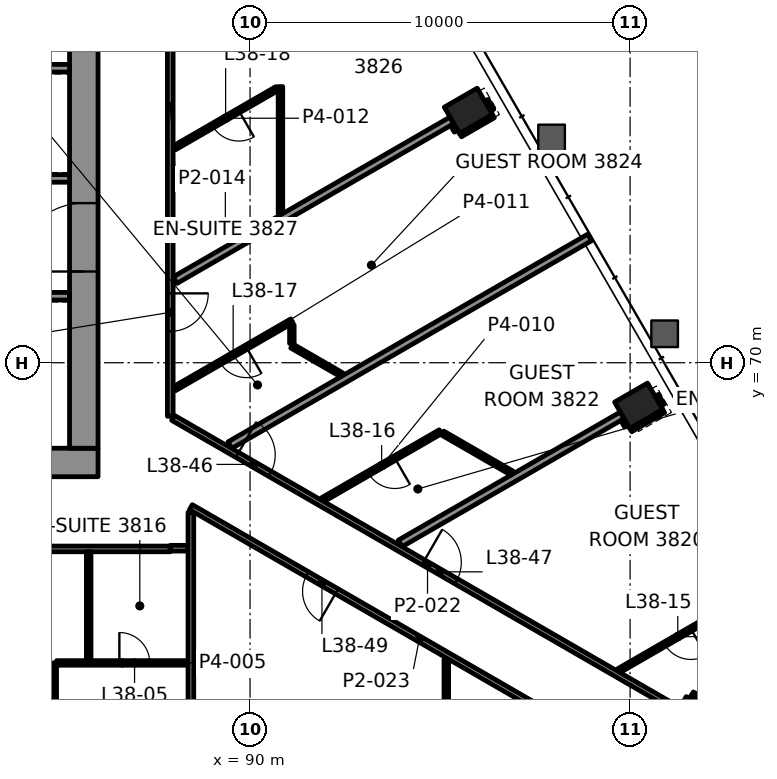
"""IFC4 building model, lengths in metres.
Left out: names, types, materials, properties, quantities, classifications, styles, units other than length and angle.
Written with IfcOpenShell. Run it as: python <this file> out.ifc"""

import sys

from ifc_helpers import new_model, si_unit, direction, frame, frame_2d, origin, origin_2d, place, context, subcontext, project, spatial, rectangle, hollow_rectangle, extrude, element, fill, save


model = new_model("IFC4")
c1 = context("Model", 3, precision=1e-05, world=origin(), true_north=direction((0.0, 1.0)))
c2 = subcontext(c1, "Body", "Model", "MODEL_VIEW")
j1 = project(units=[si_unit("LENGTHUNIT", "METRE"), si_unit("PLANEANGLEUNIT", "RADIAN")], contexts=[c1])
p1 = place(None, origin())
s1 = spatial("IfcSite", under=j1, at=p1, CompositionType="ELEMENT")
p2 = place(p1, origin())
s2 = spatial("IfcBuilding", under=s1, at=p2, CompositionType="ELEMENT")
p3 = place(p2, frame((0.0, 0.0, 167.5)))
s3 = spatial("IfcBuildingStorey", under=s2, at=p3, CompositionType="ELEMENT", Elevation=167.5)
p4 = place(p3, frame((102.127, 59.338, 0.0), z_axis=(0.0, 0.0, 1.0), x_axis=(0.5, 0.866025403784, 0.0)))
e1 = element("IfcColumn", 1, at=p4, inside=s3, PredefinedType="COLUMN", context=c2, shape_type="SweptSolid", body=[
    extrude(rectangle(XDim=2.8, YDim=2.8, at=origin_2d()), origin(), (0.0, 0.0, 1.0), 3.9),
])
for number, where, z_axis, x_axis in (
    (2, (100.225, 68.867, -0.0), (0.0, 0.0, 1.0), (-0.5, 0.866, 0.0)),
    (3, (95.744, 76.628, -0.0), (0.0, 0.0, 1.0), (-0.5, 0.866, 0.0)),
):
    element("IfcColumn", number, at=place(p3, frame(where, z_axis=z_axis, x_axis=x_axis)), inside=s3, PredefinedType="COLUMN", context=c2, shape_type="SweptSolid", body=[
        extrude(hollow_rectangle(XDim=0.8, YDim=1.0, WallThickness=0.05, at=origin_2d()), origin(), (0.0, 0.0, 1.0), 3.9),
    ])
p5 = place(p3, frame((64.0, 67.375, 0.0), z_axis=(0.0, 0.0, 1.0), x_axis=(1.0, 0.0, 0.0)))
e4 = element("IfcWall", 4, at=p5, inside=s3, PredefinedType="SHEAR", context=c2, shape_type="SweptSolid", body=[
    extrude(rectangle(XDim=22.0, YDim=0.75, at=frame_2d((11.0, 0.0))), origin(), (0.0, 0.0, 1.0), 3.7),
])
p6 = place(p5, frame((1.575, 0.0, 0.0)))
e5 = element("IfcOpeningElement", 5, at=p6, cuts=e4, PredefinedType="OPENING", context=c2, shape_type="SweptSolid", body=[
    extrude(rectangle(XDim=0.9, YDim=2.1, at=frame_2d((0.45, 1.05))), frame((0.0, 0.385, 0.0), z_axis=(0.0, -1.0, 0.0), x_axis=(1.0, 0.0, 0.0)), (0.0, 0.0, 1.0), 0.77),
])
p7 = place(p5, frame((4.425, 0.0, 0.0)))
e6 = element("IfcOpeningElement", 6, at=p7, cuts=e4, PredefinedType="OPENING", context=c2, shape_type="SweptSolid", body=[
    extrude(rectangle(XDim=0.9, YDim=2.1, at=frame_2d((0.45, 1.05))), frame((0.0, 0.385, 0.0), z_axis=(0.0, -1.0, 0.0), x_axis=(1.0, 0.0, 0.0)), (0.0, 0.0, 1.0), 0.77),
])
p8 = place(p3, frame((85.625, 67.75, 0.0), z_axis=(0.0, 0.0, 1.0), x_axis=(0.0, 1.0, 0.0)))
e7 = element("IfcWall", 7, at=p8, inside=s3, PredefinedType="SHEAR", context=c2, shape_type="SweptSolid", body=[
    extrude(rectangle(XDim=14.5, YDim=0.75, at=frame_2d((7.25, 0.0))), origin(), (0.0, 0.0, 1.0), 3.7),
])
p9 = place(p8, frame((4.65, 0.0, 0.0)))
e8 = element("IfcOpeningElement", 8, at=p9, cuts=e7, PredefinedType="OPENING", context=c2, shape_type="SweptSolid", body=[
    extrude(rectangle(XDim=1.8, YDim=2.1, at=frame_2d((0.9, 1.05))), frame((0.0, 0.385, 0.0), z_axis=(0.0, -1.0, 0.0), x_axis=(1.0, 0.0, 0.0)), (0.0, 0.0, 1.0), 0.77),
])
p10 = place(p8, frame((11.8, 0.0, 0.0)))
e9 = element("IfcOpeningElement", 9, at=p10, cuts=e7, PredefinedType="OPENING", context=c2, shape_type="SweptSolid", body=[
    extrude(rectangle(XDim=0.9, YDim=2.1, at=frame_2d((0.45, 1.05))), frame((0.0, 0.385, 0.0), z_axis=(0.0, -1.0, 0.0), x_axis=(1.0, 0.0, 0.0)), (0.0, 0.0, 1.0), 0.77),
])
p11 = place(p3, frame((84.908, 62.1, 0.0), z_axis=(0.0, 0.0, 1.0), x_axis=(1.0, 0.0, 0.0)))
e10 = element("IfcWall", 10, at=p11, inside=s3, PredefinedType="PARTITIONING", context=c2, shape_type="SweptSolid", body=[
    extrude(rectangle(XDim=3.46, YDim=0.12, at=frame_2d((1.73, 0.0))), origin(), (0.0, 0.0, 1.0), 3.1),
])
p12 = place(p11, frame((1.653, 0.0, 0.0)))
e11 = element("IfcOpeningElement", 11, at=p12, cuts=e10, PredefinedType="OPENING", context=c2, shape_type="SweptSolid", body=[
    extrude(rectangle(XDim=0.8, YDim=2.1, at=frame_2d((0.4, 1.05))), frame((0.0, 0.07, 0.0), z_axis=(0.0, -1.0, 0.0), x_axis=(1.0, 0.0, 0.0)), (0.0, 0.0, 1.0), 0.14),
])
p13 = place(p3, frame((87.899, 65.1, 0.0), z_axis=(0.0, 0.0, 1.0), x_axis=(-1.0, 0.0, 0.0)))
e12 = element("IfcWall", 12, at=p13, inside=s3, PredefinedType="PARTITIONING", context=c2, shape_type="SweptSolid", body=[
    extrude(rectangle(XDim=25.799, YDim=0.15, at=frame_2d((12.899, 0.0))), origin(), (0.0, 0.0, 1.0), 3.1),
])
p14 = place(p13, frame((4.782, 0.0, 0.0)))
e13 = element("IfcOpeningElement", 13, at=p14, cuts=e12, PredefinedType="OPENING", context=c2, shape_type="SweptSolid", body=[
    extrude(rectangle(XDim=1.0, YDim=2.1, at=frame_2d((0.5, 1.05))), frame((0.0, 0.085, 0.0), z_axis=(0.0, -1.0, 0.0), x_axis=(1.0, 0.0, 0.0)), (0.0, 0.0, 1.0), 0.17),
])
p15 = place(p13, frame((8.636, 0.0, 0.0)))
e14 = element("IfcOpeningElement", 14, at=p15, cuts=e12, PredefinedType="OPENING", context=c2, shape_type="SweptSolid", body=[
    extrude(rectangle(XDim=1.0, YDim=2.1, at=frame_2d((0.5, 1.05))), frame((0.0, 0.085, 0.0), z_axis=(0.0, -1.0, 0.0), x_axis=(1.0, 0.0, 0.0)), (0.0, 0.0, 1.0), 0.17),
])
p16 = place(p13, frame((13.117, 0.0, 0.0)))
e15 = element("IfcOpeningElement", 15, at=p16, cuts=e12, PredefinedType="OPENING", context=c2, shape_type="SweptSolid", body=[
    extrude(rectangle(XDim=1.0, YDim=2.1, at=frame_2d((0.5, 1.05))), frame((0.0, 0.085, 0.0), z_axis=(0.0, -1.0, 0.0), x_axis=(1.0, 0.0, 0.0)), (0.0, 0.0, 1.0), 0.17),
])
p17 = place(p13, frame((17.598, 0.0, 0.0)))
e16 = element("IfcOpeningElement", 16, at=p17, cuts=e12, PredefinedType="OPENING", context=c2, shape_type="SweptSolid", body=[
    extrude(rectangle(XDim=1.0, YDim=2.1, at=frame_2d((0.5, 1.05))), frame((0.0, 0.085, 0.0), z_axis=(0.0, -1.0, 0.0), x_axis=(1.0, 0.0, 0.0)), (0.0, 0.0, 1.0), 0.17),
])
p18 = place(p13, frame((22.079, 0.0, 0.0)))
e17 = element("IfcOpeningElement", 17, at=p18, cuts=e12, PredefinedType="OPENING", context=c2, shape_type="SweptSolid", body=[
    extrude(rectangle(XDim=1.0, YDim=2.1, at=frame_2d((0.5, 1.05))), frame((0.0, 0.085, 0.0), z_axis=(0.0, -1.0, 0.0), x_axis=(1.0, 0.0, 0.0)), (0.0, 0.0, 1.0), 0.17),
])
p19 = place(p3, frame((87.9, 65.119, 0.0), z_axis=(0.0, 0.0, 1.0), x_axis=(1.0, 0.0, 0.0)))
e18 = element("IfcWall", 18, at=p19, inside=s3, PredefinedType="PARTITIONING", context=c2, shape_type="SweptSolid", body=[
    extrude(rectangle(XDim=0.468, YDim=0.15, at=frame_2d((0.234, 0.0))), origin(), (0.0, 0.0, 1.0), 3.1),
])
p20 = place(p3, frame((102.8, 63.684, 0.0), z_axis=(0.0, 0.0, 1.0), x_axis=(-0.866028357664, -0.499994883695, 0.0)))
e19 = element("IfcWall", 19, at=p20, inside=s3, PredefinedType="PARTITIONING", context=c2, shape_type="SweptSolid", body=[
    extrude(rectangle(XDim=3.568, YDim=0.12, at=frame_2d((1.784, 0.0))), origin(), (0.0, 0.0, 1.0), 3.1),
])
p21 = place(p20, frame((1.384, 0.0, 0.0)))
e20 = element("IfcOpeningElement", 20, at=p21, cuts=e19, PredefinedType="OPENING", context=c2, shape_type="SweptSolid", body=[
    extrude(rectangle(XDim=0.8, YDim=2.1, at=frame_2d((0.4, 1.05))), frame((0.0, 0.07, 0.0), z_axis=(0.0, -1.0, 0.0), x_axis=(1.0, 0.0, 0.0)), (0.0, 0.0, 1.0), 0.14),
])
p22 = place(p3, frame((99.993, 68.271, 0.0), z_axis=(0.0, 0.0, 1.0), x_axis=(0.86597798544, 0.50008212199, 0.0)))
e21 = element("IfcWall", 21, at=p22, inside=s3, PredefinedType="PARTITIONING", context=c2, shape_type="SweptSolid", body=[
    extrude(rectangle(XDim=0.999, YDim=0.2, at=frame_2d((0.5, 0.0))), origin(), (0.0, 0.0, 1.0), 3.1),
])
p23 = place(p3, frame((93.951, 65.245, 0.0), z_axis=(0.0, 0.0, 1.0), x_axis=(0.866027052535, 0.49999714427, 0.0)))
e22 = element("IfcWall", 22, at=p23, inside=s3, PredefinedType="PARTITIONING", context=c2, shape_type="SweptSolid", body=[
    extrude(rectangle(XDim=6.745, YDim=0.2, at=frame_2d((3.372, 0.0))), origin(), (0.0, 0.0, 1.0), 3.1),
])
p24 = place(p3, frame((95.008, 68.183, 0.0), z_axis=(0.0, 0.0, 1.0), x_axis=(-0.866028357664, -0.499994883695, 0.0)))
e23 = element("IfcWall", 23, at=p24, inside=s3, PredefinedType="PARTITIONING", context=c2, shape_type="SweptSolid", body=[
    extrude(rectangle(XDim=3.568, YDim=0.12, at=frame_2d((1.784, 0.0))), origin(), (0.0, 0.0, 1.0), 3.1),
])
p25 = place(p24, frame((1.384, 0.0, 0.0)))
e24 = element("IfcOpeningElement", 24, at=p25, cuts=e23, PredefinedType="OPENING", context=c2, shape_type="SweptSolid", body=[
    extrude(rectangle(XDim=0.8, YDim=2.1, at=frame_2d((0.4, 1.05))), frame((0.0, 0.07, 0.0), z_axis=(0.0, -1.0, 0.0), x_axis=(1.0, 0.0, 0.0)), (0.0, 0.0, 1.0), 0.14),
])
p26 = place(p3, frame((89.47, 67.832, 0.0), z_axis=(0.0, 0.0, 1.0), x_axis=(0.866016372647, 0.500015642063, 0.0)))
e25 = element("IfcWall", 25, at=p26, inside=s3, PredefinedType="PARTITIONING", context=c2, shape_type="SweptSolid", body=[
    extrude(rectangle(XDim=10.932, YDim=0.2, at=frame_2d((5.466, 0.0))), origin(), (0.0, 0.0, 1.0), 3.022),
])
p27 = place(p3, frame((91.1, 71.101, 0.0), z_axis=(0.0, 0.0, 1.0), x_axis=(-0.866045460162, -0.499965259726, 0.0)))
e26 = element("IfcWall", 26, at=p27, inside=s3, PredefinedType="PARTITIONING", context=c2, shape_type="SweptSolid", body=[
    extrude(rectangle(XDim=3.569, YDim=0.12, at=frame_2d((1.784, 0.0))), origin(), (0.0, 0.0, 1.0), 3.1),
])
p28 = place(p27, frame((1.384, 0.0, 0.0)))
e27 = element("IfcOpeningElement", 27, at=p28, cuts=e26, PredefinedType="OPENING", context=c2, shape_type="SweptSolid", body=[
    extrude(rectangle(XDim=0.8, YDim=2.1, at=frame_2d((0.4, 1.05))), frame((0.0, 0.07, 0.0), z_axis=(0.0, -1.0, 0.0), x_axis=(1.0, 0.0, 0.0)), (0.0, 0.0, 1.0), 0.14),
])
p29 = place(p3, frame((95.512, 76.032, 0.0), z_axis=(0.0, 0.0, 1.0), x_axis=(0.86597798544, 0.50008212199, 0.0)))
e28 = element("IfcWall", 28, at=p29, inside=s3, PredefinedType="PARTITIONING", context=c2, shape_type="SweptSolid", body=[
    extrude(rectangle(XDim=0.999, YDim=0.2, at=frame_2d((0.5, 0.0))), origin(), (0.0, 0.0, 1.0), 3.022),
])
p30 = place(p3, frame((88.027, 72.173, 0.0), z_axis=(0.0, 0.0, 1.0), x_axis=(0.866035743139, 0.499982091285, 0.0)))
e29 = element("IfcWall", 29, at=p30, inside=s3, PredefinedType="PARTITIONING", context=c2, shape_type="SweptSolid", body=[
    extrude(rectangle(XDim=8.411, YDim=0.2, at=frame_2d((4.206, 0.0))), origin(), (0.0, 0.0, 1.0), 3.1),
])
p31 = place(p3, frame((90.705, 77.212, 0.0), z_axis=(0.0, 0.0, 1.0), x_axis=(-0.866009247561, -0.500027982357, 0.0)))
e30 = element("IfcWall", 30, at=p31, inside=s3, PredefinedType="PARTITIONING", context=c2, shape_type="SweptSolid", body=[
    extrude(rectangle(XDim=3.113, YDim=0.12, at=frame_2d((1.556, 0.0))), origin(), (0.0, 0.0, 1.0), 3.1),
])
p32 = place(p31, frame((1.156, 0.0, 0.0)))
e31 = element("IfcOpeningElement", 31, at=p32, cuts=e30, PredefinedType="OPENING", context=c2, shape_type="SweptSolid", body=[
    extrude(rectangle(XDim=0.8, YDim=2.1, at=frame_2d((0.4, 1.05))), frame((0.0, 0.07, 0.0), z_axis=(0.0, -1.0, 0.0), x_axis=(1.0, 0.0, 0.0)), (0.0, 0.0, 1.0), 0.14),
])
p33 = place(p3, frame((95.164, 55.121, 0.0), z_axis=(0.0, 0.0, 1.0), x_axis=(0.0, 1.0, 0.0)))
e32 = element("IfcWall", 32, at=p33, inside=s3, PredefinedType="PARTITIONING", context=c2, shape_type="SweptSolid", body=[
    extrude(rectangle(XDim=7.072, YDim=0.12, at=frame_2d((3.536, 0.0))), origin(), (0.0, 0.0, 1.0), 3.1),
])
p34 = place(p3, frame((91.1, 70.508, 0.0), z_axis=(0.0, 0.0, 1.0), x_axis=(0.0, 1.0, 0.0)))
e33 = element("IfcWall", 33, at=p34, inside=s3, PredefinedType="PARTITIONING", context=c2, shape_type="SweptSolid", body=[
    extrude(rectangle(XDim=0.484, YDim=0.12, at=frame_2d((0.242, 0.0))), origin(), (0.0, 0.0, 1.0), 3.1),
])
p35 = place(p3, frame((90.8, 73.929, 0.0), z_axis=(0.0, 0.0, 1.0), x_axis=(0.0, 1.0, 0.0)))
e34 = element("IfcWall", 34, at=p35, inside=s3, PredefinedType="PARTITIONING", context=c2, shape_type="SweptSolid", body=[
    extrude(rectangle(XDim=3.337, YDim=0.12, at=frame_2d((1.668, 0.0))), origin(), (0.0, 0.0, 1.0), 3.1),
])
p36 = place(p3, frame((88.443, 55.121, 0.0), z_axis=(0.0, 0.0, 1.0), x_axis=(0.0, 1.0, 0.0)))
e35 = element("IfcWall", 35, at=p36, inside=s3, PredefinedType="PARTITIONING", context=c2, shape_type="SweptSolid", body=[
    extrude(rectangle(XDim=10.942, YDim=0.15, at=frame_2d((5.471, 0.0))), origin(), (0.0, 0.0, 1.0), 2.947),
])
p37 = place(p3, frame((87.9, 84.899, 0.0), z_axis=(0.0, 0.0, 1.0), x_axis=(0.0, -1.0, 0.0)))
e36 = element("IfcWall", 36, at=p37, inside=s3, PredefinedType="PARTITIONING", context=c2, shape_type="SweptSolid", body=[
    extrude(rectangle(XDim=16.308, YDim=0.15, at=frame_2d((8.154, 0.0))), origin(), (0.0, 0.0, 1.0), 3.1),
])
p38 = place(p37, frame((5.527, 0.0, 0.0)))
e37 = element("IfcOpeningElement", 37, at=p38, cuts=e36, PredefinedType="OPENING", context=c2, shape_type="SweptSolid", body=[
    extrude(rectangle(XDim=1.0, YDim=2.1, at=frame_2d((0.5, 1.05))), frame((0.0, 0.085, 0.0), z_axis=(0.0, -1.0, 0.0), x_axis=(1.0, 0.0, 0.0)), (0.0, 0.0, 1.0), 0.17),
])
p39 = place(p37, frame((13.074, 0.0, 0.0)))
e38 = element("IfcOpeningElement", 38, at=p39, cuts=e36, PredefinedType="OPENING", context=c2, shape_type="SweptSolid", body=[
    extrude(rectangle(XDim=1.0, YDim=2.1, at=frame_2d((0.5, 1.05))), frame((0.0, 0.085, 0.0), z_axis=(0.0, -1.0, 0.0), x_axis=(1.0, 0.0, 0.0)), (0.0, 0.0, 1.0), 0.17),
])
p40 = place(p3, frame((85.754, 62.16, 0.0), z_axis=(0.0, 0.0, 1.0), x_axis=(0.0, 1.0, 0.0)))
e39 = element("IfcWall", 39, at=p40, inside=s3, PredefinedType="PARTITIONING", context=c2, shape_type="SweptSolid", body=[
    extrude(rectangle(XDim=2.865, YDim=0.12, at=frame_2d((1.433, 0.0))), origin(), (0.0, 0.0, 1.0), 3.1),
])
p41 = place(p3, frame((84.858, 62.1, 0.0), z_axis=(0.0, 0.0, 1.0), x_axis=(0.0, -1.0, 0.0)))
e40 = element("IfcWall", 40, at=p41, inside=s3, PredefinedType="PARTITIONING", context=c2, shape_type="SweptSolid", body=[
    extrude(rectangle(XDim=6.979, YDim=0.1, at=frame_2d((3.49, 0.0))), origin(), (0.0, 0.0, 1.0), 3.022),
])
p42 = place(p41, frame((2.79, 0.0, 0.0)))
e41 = element("IfcOpeningElement", 41, at=p42, cuts=e40, PredefinedType="OPENING", context=c2, shape_type="SweptSolid", body=[
    extrude(rectangle(XDim=0.9, YDim=2.1, at=frame_2d((0.45, 1.05))), frame((0.0, 0.06, 0.0), z_axis=(0.0, -1.0, 0.0), x_axis=(1.0, 0.0, 0.0)), (0.0, 0.0, 1.0), 0.12),
])
for number, where, z_axis, x_axis in (
    (42, (100.808, 68.858, 0.0), (0.0, 0.0, 1.0), (-0.5, 0.866, 0.0)),
    (43, (96.327, 76.619, 0.0), (0.0, 0.0, 1.0), (-0.5, 0.866, 0.0)),
):
    element("IfcWall", number, at=place(p3, frame(where, z_axis=z_axis, x_axis=x_axis)), inside=s3, PredefinedType="PARTITIONING", context=c2, shape_type="SweptSolid", body=[
        extrude(rectangle(XDim=0.299, YDim=0.2, at=frame_2d((0.149, 0.0))), origin(), (0.0, 0.0, 1.0), 3.1),
    ])
for number, where, z_axis, x_axis in (
    (44, (99.942, 68.358, 0.0), (0.0, 0.0, 1.0), (-0.5, 0.866, 0.0)),
    (45, (95.461, 76.119, 0.0), (0.0, 0.0, 1.0), (-0.5, 0.866, 0.0)),
):
    element("IfcWall", number, at=place(p3, frame(where, z_axis=z_axis, x_axis=x_axis)), inside=s3, PredefinedType="PARTITIONING", context=c2, shape_type="SweptSolid", body=[
        extrude(rectangle(XDim=0.199, YDim=0.2, at=frame_2d((0.1, 0.0))), origin(), (0.0, 0.0, 1.0), 3.1),
    ])
p43 = place(p3, frame((96.889, 67.097, 0.0), z_axis=(0.0, 0.0, 1.0), x_axis=(-0.866034836963, 0.4999836609, 0.0)))
e46 = element("IfcWall", 46, at=p43, inside=s3, PredefinedType="PARTITIONING", context=c2, shape_type="SweptSolid", body=[
    extrude(rectangle(XDim=2.104, YDim=0.12, at=frame_2d((1.052, 0.0))), origin(), (0.0, 0.0, 1.0), 3.1),
])
p44 = place(p3, frame((92.408, 69.684, 0.0), z_axis=(0.0, 0.0, 1.0), x_axis=(-0.865986401109, 0.500067548531, 0.0)))
e47 = element("IfcWall", 47, at=p44, inside=s3, PredefinedType="PARTITIONING", context=c2, shape_type="SweptSolid", body=[
    extrude(rectangle(XDim=1.51, YDim=0.12, at=frame_2d((0.755, 0.0))), origin(), (0.0, 0.0, 1.0), 3.1),
])
p45 = place(p3, frame((104.438, 59.621, 0.0), z_axis=(0.0, 0.0, 1.0), x_axis=(-0.866035906198, 0.499981808845, 0.0)))
e48 = element("IfcWall", 48, at=p45, inside=s3, PredefinedType="PARTITIONING", context=c2, shape_type="SweptSolid", body=[
    extrude(rectangle(XDim=3.259, YDim=0.2, at=frame_2d((1.63, 0.0))), origin(), (0.0, 0.0, 1.0), 3.1),
])
p46 = place(p3, frame((87.975, 68.548, 0.0), z_axis=(0.0, 0.0, 1.0), x_axis=(0.866029648708, -0.499992647504, 0.0)))
e49 = element("IfcWall", 49, at=p46, inside=s3, PredefinedType="PARTITIONING", context=c2, shape_type="SweptSolid", body=[
    extrude(rectangle(XDim=15.461, YDim=0.15, at=frame_2d((7.73, 0.0))), origin(), (0.0, 0.0, 1.0), 3.1),
])
p47 = place(p46, frame((1.948, 0.0, 0.0)))
e50 = element("IfcOpeningElement", 50, at=p47, cuts=e49, PredefinedType="OPENING", context=c2, shape_type="SweptSolid", body=[
    extrude(rectangle(XDim=1.0, YDim=2.1, at=frame_2d((0.5, 1.05))), frame((0.0, 0.085, 0.0), z_axis=(0.0, -1.0, 0.0), x_axis=(1.0, 0.0, 0.0)), (0.0, 0.0, 1.0), 0.17),
])
p48 = place(p46, frame((7.602, 0.0, 0.0)))
e51 = element("IfcOpeningElement", 51, at=p48, cuts=e49, PredefinedType="OPENING", context=c2, shape_type="SweptSolid", body=[
    extrude(rectangle(XDim=1.0, YDim=2.1, at=frame_2d((0.5, 1.05))), frame((0.0, 0.085, 0.0), z_axis=(0.0, -1.0, 0.0), x_axis=(1.0, 0.0, 0.0)), (0.0, 0.0, 1.0), 0.17),
])
p49 = place(p3, frame((100.464, 59.259, 0.0), z_axis=(0.0, 0.0, 1.0), x_axis=(-0.866026545444, 0.499998022582, 0.0)))
e52 = element("IfcWall", 52, at=p49, inside=s3, PredefinedType="PARTITIONING", context=c2, shape_type="SweptSolid", body=[
    extrude(rectangle(XDim=13.881, YDim=0.15, at=frame_2d((6.94, 0.0))), origin(), (0.0, 0.0, 1.0), 2.947),
])
p50 = place(p49, frame((0.566, 0.0, 0.0)))
e53 = element("IfcOpeningElement", 53, at=p50, cuts=e52, PredefinedType="OPENING", context=c2, shape_type="SweptSolid", body=[
    extrude(rectangle(XDim=1.0, YDim=2.1, at=frame_2d((0.5, 1.05))), frame((0.0, 0.085, 0.0), z_axis=(0.0, -1.0, 0.0), x_axis=(1.0, 0.0, 0.0)), (0.0, 0.0, 1.0), 0.17),
])
p51 = place(p49, frame((9.448, 0.0, 0.0)))
e54 = element("IfcOpeningElement", 54, at=p51, cuts=e52, PredefinedType="OPENING", context=c2, shape_type="SweptSolid", body=[
    extrude(rectangle(XDim=0.9, YDim=2.1, at=frame_2d((0.45, 1.05))), frame((0.0, 0.085, 0.0), z_axis=(0.0, -1.0, 0.0), x_axis=(1.0, 0.0, 0.0)), (0.0, 0.0, 1.0), 0.17),
])
p52 = place(p3, frame((101.402, 60.883, 0.0), z_axis=(0.0, 0.0, 1.0), x_axis=(0.500265064493, 0.865872314633, 0.0)))
e55 = element("IfcWall", 55, at=p52, inside=s3, PredefinedType="PARTITIONING", context=c2, shape_type="SweptSolid", body=[
    extrude(rectangle(XDim=0.324, YDim=0.2, at=frame_2d((0.162, 0.0))), origin(), (0.0, 0.0, 1.0), 3.1),
])
for number, where, z_axis, x_axis in (
    (56, (84.6, 71.75, 0.0), (0.0, 0.0, 1.0), (1.0, 0.0, 0.0)),
    (57, (84.6, 74.85, 0.0), (0.0, 0.0, 1.0), (1.0, 0.0, 0.0)),
    (58, (84.6, 77.75, 0.0), (0.0, 0.0, 1.0), (1.0, 0.0, 0.0)),
):
    element("IfcWall", number, at=place(p3, frame(where, z_axis=z_axis, x_axis=x_axis)), inside=s3, PredefinedType="PARTITIONING", context=c2, shape_type="SweptSolid", body=[
        extrude(rectangle(XDim=0.65, YDim=0.2, at=frame_2d((0.325, 0.0))), origin(), (0.0, 0.0, 1.0), 3.7),
    ])
p53 = place(p12, origin())
e59 = element("IfcDoor", 59, at=p53, inside=s3, OperationType="SINGLE_SWING_LEFT", PredefinedType="DOOR", context=c2, shape_type="SweptSolid", body=[
    extrude(rectangle(XDim=0.8, YDim=2.1, at=frame_2d((0.4, 1.05))), frame((0.0, 0.025, 0.0), z_axis=(0.0, -1.0, 0.0), x_axis=(1.0, 0.0, 0.0)), (0.0, 0.0, 1.0), 0.05),
])
fill(e11, e59)
p54 = place(p21, origin())
e60 = element("IfcDoor", 60, at=p54, inside=s3, OperationType="SINGLE_SWING_LEFT", PredefinedType="DOOR", context=c2, shape_type="SweptSolid", body=[
    extrude(rectangle(XDim=0.8, YDim=2.1, at=frame_2d((0.4, 1.05))), frame((0.0, 0.025, 0.0), z_axis=(0.0, -1.0, 0.0), x_axis=(1.0, 0.0, 0.0)), (0.0, 0.0, 1.0), 0.05),
])
fill(e20, e60)
p55 = place(p25, origin())
e61 = element("IfcDoor", 61, at=p55, inside=s3, OperationType="SINGLE_SWING_LEFT", PredefinedType="DOOR", context=c2, shape_type="SweptSolid", body=[
    extrude(rectangle(XDim=0.8, YDim=2.1, at=frame_2d((0.4, 1.05))), frame((0.0, 0.025, 0.0), z_axis=(0.0, -1.0, 0.0), x_axis=(1.0, 0.0, 0.0)), (0.0, 0.0, 1.0), 0.05),
])
fill(e24, e61)
p56 = place(p28, origin())
e62 = element("IfcDoor", 62, at=p56, inside=s3, OperationType="SINGLE_SWING_LEFT", PredefinedType="DOOR", context=c2, shape_type="SweptSolid", body=[
    extrude(rectangle(XDim=0.8, YDim=2.1, at=frame_2d((0.4, 1.05))), frame((0.0, 0.025, 0.0), z_axis=(0.0, -1.0, 0.0), x_axis=(1.0, 0.0, 0.0)), (0.0, 0.0, 1.0), 0.05),
])
fill(e27, e62)
p57 = place(p32, origin())
e63 = element("IfcDoor", 63, at=p57, inside=s3, OperationType="SINGLE_SWING_LEFT", PredefinedType="DOOR", context=c2, shape_type="SweptSolid", body=[
    extrude(rectangle(XDim=0.8, YDim=2.1, at=frame_2d((0.4, 1.05))), frame((0.0, 0.025, 0.0), z_axis=(0.0, -1.0, 0.0), x_axis=(1.0, 0.0, 0.0)), (0.0, 0.0, 1.0), 0.05),
])
fill(e31, e63)
p58 = place(p39, origin())
e64 = element("IfcDoor", 64, at=p58, inside=s3, OperationType="SINGLE_SWING_RIGHT", PredefinedType="DOOR", context=c2, shape_type="SweptSolid", body=[
    extrude(rectangle(XDim=1.0, YDim=2.1, at=frame_2d((0.5, 1.05))), frame((0.0, 0.025, 0.0), z_axis=(0.0, -1.0, 0.0), x_axis=(1.0, 0.0, 0.0)), (0.0, 0.0, 1.0), 0.05),
])
fill(e38, e64)
p59 = place(p47, origin())
e65 = element("IfcDoor", 65, at=p59, inside=s3, OperationType="SINGLE_SWING_RIGHT", PredefinedType="DOOR", context=c2, shape_type="SweptSolid", body=[
    extrude(rectangle(XDim=1.0, YDim=2.1, at=frame_2d((0.5, 1.05))), frame((0.0, 0.025, 0.0), z_axis=(0.0, -1.0, 0.0), x_axis=(1.0, 0.0, 0.0)), (0.0, 0.0, 1.0), 0.05),
])
fill(e50, e65)
p60 = place(p48, origin())
e66 = element("IfcDoor", 66, at=p60, inside=s3, OperationType="SINGLE_SWING_RIGHT", PredefinedType="DOOR", context=c2, shape_type="SweptSolid", body=[
    extrude(rectangle(XDim=1.0, YDim=2.1, at=frame_2d((0.5, 1.05))), frame((0.0, 0.025, 0.0), z_axis=(0.0, -1.0, 0.0), x_axis=(1.0, 0.0, 0.0)), (0.0, 0.0, 1.0), 0.05),
])
fill(e51, e66)
p61 = place(p51, origin())
e67 = element("IfcDoor", 67, at=p61, inside=s3, OperationType="SINGLE_SWING_RIGHT", PredefinedType="DOOR", context=c2, shape_type="SweptSolid", body=[
    extrude(rectangle(XDim=0.9, YDim=2.1, at=frame_2d((0.45, 1.05))), frame((0.0, 0.025, 0.0), z_axis=(0.0, -1.0, 0.0), x_axis=(1.0, 0.0, 0.0)), (0.0, 0.0, 1.0), 0.05),
])
fill(e54, e67)
p62 = place(p9, origin())
e68 = element("IfcDoor", 68, at=p62, inside=s3, OperationType="SINGLE_SWING_RIGHT", PredefinedType="DOOR", context=c2, shape_type="SweptSolid", body=[
    extrude(rectangle(XDim=1.8, YDim=2.1, at=frame_2d((0.9, 1.05))), frame((0.0, 0.095, 0.0), z_axis=(0.0, -1.0, 0.0), x_axis=(1.0, 0.0, 0.0)), (0.0, 0.0, 1.0), 0.19),
])
fill(e8, e68)
save(model, sys.argv[1])
